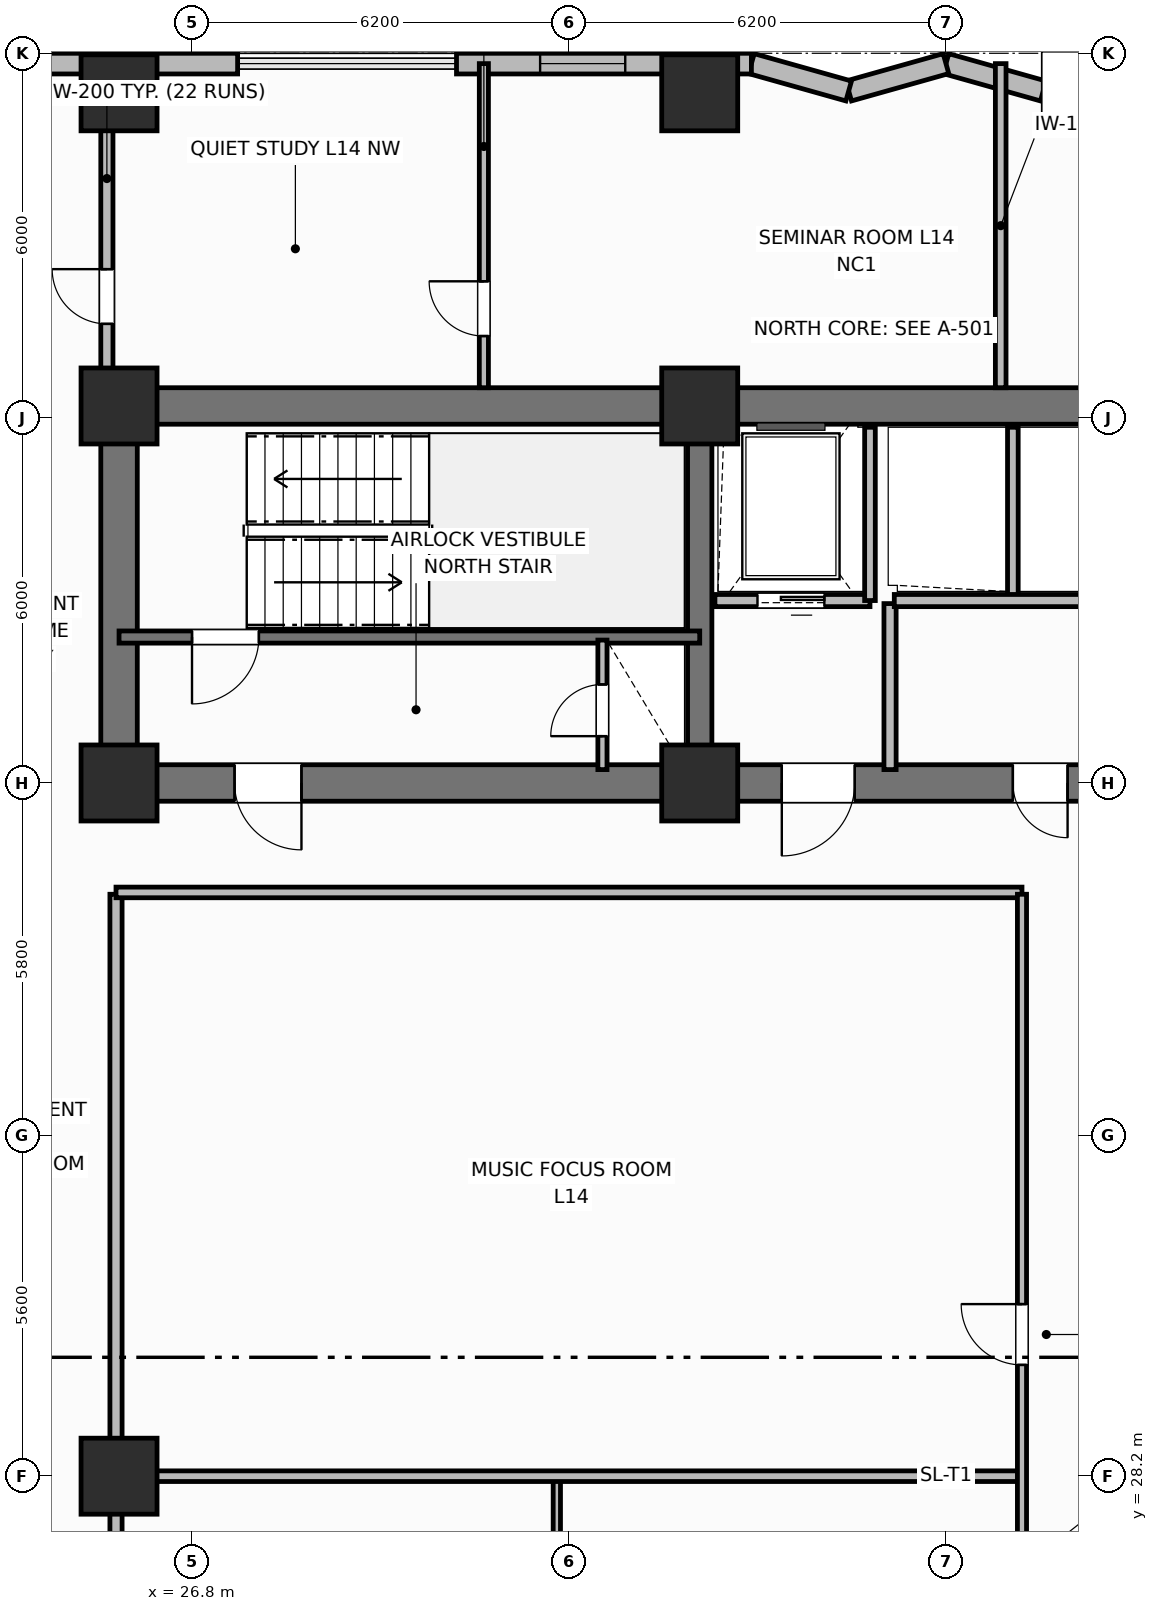
"""IFC4 building model, lengths in metres.
Left out: names, types, materials, properties, quantities, classifications, styles, units other than length and angle.
Written with IfcOpenShell. Run it as: python <this file> out.ifc"""

import sys

from ifc_helpers import new_model, si_unit, direction, frame, frame_2d, origin, origin_2d, place, context, subcontext, project, spatial, rectangle, extrude, element, fill, save


model = new_model("IFC4")
c1 = context("Model", 3, precision=1e-05, world=origin(), true_north=direction((0.0, 1.0)))
c2 = subcontext(c1, "Body", "Model", "MODEL_VIEW")
j1 = project(units=[si_unit("LENGTHUNIT", "METRE"), si_unit("PLANEANGLEUNIT", "RADIAN")], contexts=[c1])
p1 = place(None, origin())
s1 = spatial("IfcSite", under=j1, at=p1, CompositionType="ELEMENT")
p2 = place(p1, origin())
s2 = spatial("IfcBuilding", under=s1, at=p2, CompositionType="ELEMENT")
p3 = place(p2, frame((0.0, 0.0, 58.4)))
s3 = spatial("IfcBuildingStorey", under=s2, at=p3, CompositionType="ELEMENT", Elevation=58.4)
p4 = place(p3, frame((25.6, 45.8, 0.0), z_axis=(0.0, 0.0, 1.0), x_axis=(1.0, 0.0, 0.0)))
e1 = element("IfcWall", 1, at=p4, inside=s3, PredefinedType="SHEAR", context=c2, shape_type="SweptSolid", body=[
    extrude(rectangle(XDim=27.2, YDim=0.6, at=frame_2d((13.6, 0.0))), origin(), (0.0, 0.0, 1.0), 3.7),
])
p5 = place(p3, frame((25.6, 39.9, 0.0), z_axis=(0.0, 0.0, 1.0), x_axis=(0.0, 1.0, 0.0)))
e2 = element("IfcWall", 2, at=p5, inside=s3, PredefinedType="SHEAR", context=c2, shape_type="SweptSolid", body=[
    extrude(rectangle(XDim=5.6, YDim=0.6, at=frame_2d((2.8, 0.0))), origin(), (0.0, 0.0, 1.0), 3.7),
])
p6 = place(p3, frame((52.8, 39.6, 0.0), z_axis=(0.0, 0.0, 1.0), x_axis=(-1.0, 0.0, 0.0)))
e3 = element("IfcWall", 3, at=p6, inside=s3, PredefinedType="SHEAR", context=c2, shape_type="SweptSolid", body=[
    extrude(rectangle(XDim=27.2, YDim=0.6, at=frame_2d((13.6, 0.0))), origin(), (0.0, 0.0, 1.0), 3.7),
])
p7 = place(p6, frame((24.2, 0.0, 0.0)))
e4 = element("IfcOpeningElement", 4, at=p7, cuts=e3, PredefinedType="OPENING", context=c2, shape_type="SweptSolid", body=[
    extrude(rectangle(XDim=1.1, YDim=2.15, at=frame_2d((0.55, 1.075))), frame((0.0, 0.31, 0.0), z_axis=(0.0, -1.0, 0.0), x_axis=(1.0, 0.0, 0.0)), (0.0, 0.0, 1.0), 0.62),
])
p8 = place(p6, frame((15.1, 0.0, 0.0)))
e5 = element("IfcOpeningElement", 5, at=p8, cuts=e3, PredefinedType="OPENING", context=c2, shape_type="SweptSolid", body=[
    extrude(rectangle(XDim=1.2, YDim=2.15, at=frame_2d((0.6, 1.075))), frame((0.0, 0.31, 0.0), z_axis=(0.0, -1.0, 0.0), x_axis=(1.0, 0.0, 0.0)), (0.0, 0.0, 1.0), 0.62),
])
p9 = place(p6, frame((11.6, 0.0, 0.0)))
e6 = element("IfcOpeningElement", 6, at=p9, cuts=e3, PredefinedType="OPENING", context=c2, shape_type="SweptSolid", body=[
    extrude(rectangle(XDim=0.9, YDim=2.1, at=frame_2d((0.45, 1.05))), frame((0.0, 0.31, 0.0), z_axis=(0.0, -1.0, 0.0), x_axis=(1.0, 0.0, 0.0)), (0.0, 0.0, 1.0), 0.62),
])
p10 = place(p6, frame((3.6, 0.0, 0.0)))
e7 = element("IfcOpeningElement", 7, at=p10, cuts=e3, PredefinedType="OPENING", context=c2, shape_type="SweptSolid", body=[
    extrude(rectangle(XDim=1.0, YDim=2.15, at=frame_2d((0.5, 1.075))), frame((0.0, 0.31, 0.0), z_axis=(0.0, -1.0, 0.0), x_axis=(1.0, 0.0, 0.0)), (0.0, 0.0, 1.0), 0.62),
])
p11 = place(p3, frame((35.15, 39.9, 0.0), z_axis=(0.0, 0.0, 1.0), x_axis=(0.0, 1.0, 0.0)))
e8 = element("IfcWall", 8, at=p11, inside=s3, PredefinedType="SHEAR", context=c2, shape_type="SweptSolid", body=[
    extrude(rectangle(XDim=5.6, YDim=0.4, at=frame_2d((2.8, 0.0))), origin(), (0.0, 0.0, 1.0), 3.7),
])
for number, where, z_axis, x_axis in (
    (9, (25.6, 39.6, 0.0), (0.0, 0.0, 1.0), (1.0, 0.0, 0.0)),
    (10, (25.6, 45.8, 0.0), (0.0, 0.0, 1.0), (1.0, 0.0, 0.0)),
    (11, (35.15, 39.6, 0.0), (0.0, 0.0, 1.0), (1.0, 0.0, 0.0)),
    (12, (35.15, 45.8, 0.0), (0.0, 0.0, 1.0), (1.0, 0.0, 0.0)),
    (13, (25.6, 28.2, 0.0), (0.0, 0.0, 1.0), (1.0, 0.0, 0.0)),
    (14, (25.6, 50.95, 0.0), (0.0, 0.0, 1.0), (1.0, 0.0, 0.0)),
    (15, (35.15, 50.95, 0.0), (0.0, 0.0, 1.0), (1.0, 0.0, 0.0)),
):
    element("IfcColumn", number, at=place(p3, frame(where, z_axis=z_axis, x_axis=x_axis)), inside=s3, PredefinedType="COLUMN", context=c2, shape_type="SweptSolid", body=[
        extrude(rectangle(XDim=1.25, YDim=1.25, at=origin_2d()), origin(), (0.0, 0.0, 1.0), 3.7),
    ])
p12 = place(p3, frame((42.4, 51.43, 0.0), z_axis=(0.0, 0.0, 1.0), x_axis=(-0.962652136636, -0.270741322725, 0.0)))
e16 = element("IfcWall", 16, at=p12, inside=s3, PredefinedType="SOLIDWALL", context=c2, shape_type="SweptSolid", body=[
    extrude(rectangle(XDim=1.662, YDim=0.34, at=frame_2d((0.831, 0.0))), origin(), (0.0, 0.0, 1.0), 2.7),
])
p13 = place(p3, frame((40.8, 50.98, 0.0), z_axis=(0.0, 0.0, 1.0), x_axis=(-0.962662902433, 0.270703040766, 0.0)))
e17 = element("IfcWall", 17, at=p13, inside=s3, PredefinedType="SOLIDWALL", context=c2, shape_type="SweptSolid", body=[
    extrude(rectangle(XDim=1.662, YDim=0.34, at=frame_2d((0.831, 0.0))), origin(), (0.0, 0.0, 1.0), 2.7),
])
p14 = place(p3, frame((39.2, 51.43, 0.0), z_axis=(0.0, 0.0, 1.0), x_axis=(-0.962652136636, -0.270741322725, 0.0)))
e18 = element("IfcWall", 18, at=p14, inside=s3, PredefinedType="SOLIDWALL", context=c2, shape_type="SweptSolid", body=[
    extrude(rectangle(XDim=1.662, YDim=0.34, at=frame_2d((0.831, 0.0))), origin(), (0.0, 0.0, 1.0), 2.7),
])
p15 = place(p3, frame((37.6, 50.98, 0.0), z_axis=(0.0, 0.0, 1.0), x_axis=(-0.962662902433, 0.270703040766, 0.0)))
e19 = element("IfcWall", 19, at=p15, inside=s3, PredefinedType="SOLIDWALL", context=c2, shape_type="SweptSolid", body=[
    extrude(rectangle(XDim=1.662, YDim=0.34, at=frame_2d((0.831, 0.0))), origin(), (0.0, 0.0, 1.0), 2.7),
])
p16 = place(p3, frame((36.0, 51.43, 0.0), z_axis=(0.0, 0.0, 1.0), x_axis=(-1.0, 0.0, 0.0)))
e20 = element("IfcWall", 20, at=p16, inside=s3, PredefinedType="SOLIDWALL", context=c2, shape_type="SweptSolid", body=[
    extrude(rectangle(XDim=4.85, YDim=0.34, at=frame_2d((2.425, 0.0))), origin(), (0.0, 0.0, 1.0), 2.7),
])
p17 = place(p16, frame((2.075, 0.0, 0.73)))
e21 = element("IfcOpeningElement", 21, at=p17, cuts=e20, PredefinedType="OPENING", context=c2, shape_type="SweptSolid", body=[
    extrude(rectangle(XDim=1.4, YDim=1.85, at=frame_2d((0.7, 0.925))), frame((0.0, 0.18, 0.0), z_axis=(0.0, -1.0, 0.0), x_axis=(1.0, 0.0, 0.0)), (0.0, 0.0, 1.0), 0.36),
])
p18 = place(p3, frame((27.55, 51.43, 0.0), z_axis=(0.0, 0.0, 1.0), x_axis=(-1.0, 0.0, 0.0)))
e22 = element("IfcWall", 22, at=p18, inside=s3, PredefinedType="SOLIDWALL", context=c2, shape_type="SweptSolid", body=[
    extrude(rectangle(XDim=8.95, YDim=0.34, at=frame_2d((4.475, 0.0))), origin(), (0.0, 0.0, 1.0), 2.7),
])
p19 = place(p18, frame((5.688, 0.0, 0.73)))
e23 = element("IfcOpeningElement", 23, at=p19, cuts=e22, PredefinedType="OPENING", context=c2, shape_type="SweptSolid", body=[
    extrude(rectangle(XDim=1.4, YDim=1.85, at=frame_2d((0.7, 0.925))), frame((0.0, 0.18, 0.0), z_axis=(0.0, -1.0, 0.0), x_axis=(1.0, 0.0, 0.0)), (0.0, 0.0, 1.0), 0.36),
])
p20 = place(p3, frame((35.15, 42.0, 0.0), z_axis=(0.0, 0.0, 1.0), x_axis=(-1.0, 0.0, 0.0)))
e24 = element("IfcWall", 24, at=p20, inside=s3, PredefinedType="SHEAR", context=c2, shape_type="SweptSolid", body=[
    extrude(rectangle(XDim=9.55, YDim=0.2, at=frame_2d((4.775, 0.0))), origin(), (0.0, 0.0, 1.0), 3.7),
])
p21 = place(p20, frame((7.25, 0.0, 0.0)))
e25 = element("IfcOpeningElement", 25, at=p21, cuts=e24, PredefinedType="OPENING", context=c2, shape_type="SweptSolid", body=[
    extrude(rectangle(XDim=1.1, YDim=2.15, at=frame_2d((0.55, 1.075))), frame((0.0, 0.11, 0.0), z_axis=(0.0, -1.0, 0.0), x_axis=(1.0, 0.0, 0.0)), (0.0, 0.0, 1.0), 0.22),
])
p22 = place(p3, frame((33.55, 39.82, 0.0), z_axis=(0.0, 0.0, 1.0), x_axis=(0.0, 1.0, 0.0)))
e26 = element("IfcWall", 26, at=p22, inside=s3, PredefinedType="PARTITIONING", context=c2, shape_type="SweptSolid", body=[
    extrude(rectangle(XDim=2.13, YDim=0.15, at=frame_2d((1.065, 0.0))), origin(), (0.0, 0.0, 1.0), 2.53),
])
p23 = place(p22, frame((0.55, 0.0, 0.0)))
e27 = element("IfcOpeningElement", 27, at=p23, cuts=e26, PredefinedType="OPENING", context=c2, shape_type="SweptSolid", body=[
    extrude(rectangle(XDim=0.85, YDim=2.05, at=frame_2d((0.425, 1.025))), frame((0.0, 0.085, 0.0), z_axis=(0.0, -1.0, 0.0), x_axis=(1.0, 0.0, 0.0)), (0.0, 0.0, 1.0), 0.17),
])
p24 = place(p3, frame((37.95, 42.6, 0.0), z_axis=(0.0, 0.0, 1.0), x_axis=(-1.0, 0.0, 0.0)))
e28 = element("IfcWall", 28, at=p24, inside=s3, PredefinedType="PARTITIONING", context=c2, shape_type="SweptSolid", body=[
    extrude(rectangle(XDim=2.55, YDim=0.2, at=frame_2d((1.275, 0.0))), origin(), (0.0, 0.0, 1.0), 2.3),
])
p25 = place(p24, frame((0.75, 0.0, 0.0)))
e29 = element("IfcOpeningElement", 29, at=p25, cuts=e28, PredefinedType="OPENING", context=c2, shape_type="SweptSolid", body=[
    extrude(rectangle(XDim=1.1, YDim=2.15, at=frame_2d((0.55, 1.075))), frame((0.0, 0.11, 0.0), z_axis=(0.0, -1.0, 0.0), x_axis=(1.0, 0.0, 0.0)), (0.0, 0.0, 1.0), 0.22),
])
p26 = place(p3, frame((37.95, 42.6, 0.0), z_axis=(0.0, 0.0, 1.0), x_axis=(0.0, 1.0, 0.0)))
e30 = element("IfcWall", 30, at=p26, inside=s3, PredefinedType="PARTITIONING", context=c2, shape_type="SweptSolid", body=[
    extrude(rectangle(XDim=2.85, YDim=0.175, at=frame_2d((1.425, 0.0))), origin(), (0.0, 0.0, 1.0), 2.53),
])
p27 = place(p3, frame((38.28, 39.82, 0.0), z_axis=(0.0, 0.0, 1.0), x_axis=(0.0, 1.0, 0.0)))
e31 = element("IfcWall", 31, at=p27, inside=s3, PredefinedType="PARTITIONING", context=c2, shape_type="SweptSolid", body=[
    extrude(rectangle(XDim=2.73, YDim=0.2, at=frame_2d((1.365, 0.0))), origin(), (0.0, 0.0, 1.0), 2.53),
])
p28 = place(p3, frame((40.3, 42.65, 0.0), z_axis=(0.0, 0.0, 1.0), x_axis=(0.0, 1.0, 0.0)))
e32 = element("IfcWall", 32, at=p28, inside=s3, PredefinedType="PARTITIONING", context=c2, shape_type="SweptSolid", body=[
    extrude(rectangle(XDim=2.8, YDim=0.175, at=frame_2d((1.4, 0.0))), origin(), (0.0, 0.0, 1.0), 2.53),
])
p29 = place(p3, frame((42.95, 42.6, 0.0), z_axis=(0.0, 0.0, 1.0), x_axis=(-1.0, 0.0, 0.0)))
e33 = element("IfcWall", 33, at=p29, inside=s3, PredefinedType="PARTITIONING", context=c2, shape_type="SweptSolid", body=[
    extrude(rectangle(XDim=4.6, YDim=0.2, at=frame_2d((2.3, 0.0))), origin(), (0.0, 0.0, 1.0), 2.3),
])
p30 = place(p3, frame((25.55, 18.63, 0.0), z_axis=(0.0, 0.0, 1.0), x_axis=(0.0, 1.0, 0.0)))
e34 = element("IfcWall", 34, at=p30, inside=s3, PredefinedType="PARTITIONING", context=c2, shape_type="SweptSolid", body=[
    extrude(rectangle(XDim=19.14, YDim=0.2, at=frame_2d((9.57, 0.0))), origin(), (0.0, 0.0, 1.0), 2.53),
])
p31 = place(p3, frame((25.55, 37.8, 0.0), z_axis=(0.0, 0.0, 1.0), x_axis=(1.0, 0.0, 0.0)))
e35 = element("IfcWall", 35, at=p31, inside=s3, PredefinedType="PARTITIONING", context=c2, shape_type="SweptSolid", body=[
    extrude(rectangle(XDim=14.9, YDim=0.175, at=frame_2d((7.45, 0.0))), origin(), (0.0, 0.0, 1.0), 2.53),
])
p32 = place(p3, frame((32.8, 18.66, 0.0), z_axis=(0.0, 0.0, 1.0), x_axis=(0.0, 1.0, 0.0)))
e36 = element("IfcWall", 36, at=p32, inside=s3, PredefinedType="PARTITIONING", context=c2, shape_type="SweptSolid", body=[
    extrude(rectangle(XDim=9.49, YDim=0.12, at=frame_2d((4.745, 0.0))), origin(), (0.0, 0.0, 1.0), 2.53),
])
p33 = place(p32, frame((2.2, 0.0, 0.0)))
e37 = element("IfcOpeningElement", 37, at=p33, cuts=e36, PredefinedType="OPENING", context=c2, shape_type="SweptSolid", body=[
    extrude(rectangle(XDim=0.9, YDim=2.1, at=frame_2d((0.45, 1.05))), frame((0.0, 0.07, 0.0), z_axis=(0.0, -1.0, 0.0), x_axis=(1.0, 0.0, 0.0)), (0.0, 0.0, 1.0), 0.14),
])
p34 = place(p3, frame((25.6, 28.2, 0.0), z_axis=(0.0, 0.0, 1.0), x_axis=(1.0, 0.0, 0.0)))
e38 = element("IfcWall", 38, at=p34, inside=s3, PredefinedType="PARTITIONING", context=c2, shape_type="SweptSolid", body=[
    extrude(rectangle(XDim=14.87, YDim=0.175, at=frame_2d((7.435, 0.0))), origin(), (0.0, 0.0, 1.0), 2.53),
])
p35 = place(p3, frame((40.45, 18.63, 0.0), z_axis=(0.0, 0.0, 1.0), x_axis=(0.0, 1.0, 0.0)))
e39 = element("IfcWall", 39, at=p35, inside=s3, PredefinedType="PARTITIONING", context=c2, shape_type="SweptSolid", body=[
    extrude(rectangle(XDim=19.14, YDim=0.15, at=frame_2d((9.57, 0.0))), origin(), (0.0, 0.0, 1.0), 2.53),
])
p36 = place(p35, frame((2.4, 0.0, 0.0)))
e40 = element("IfcOpeningElement", 40, at=p36, cuts=e39, PredefinedType="OPENING", context=c2, shape_type="SweptSolid", body=[
    extrude(rectangle(XDim=1.0, YDim=2.15, at=frame_2d((0.5, 1.075))), frame((0.0, 0.085, 0.0), z_axis=(0.0, -1.0, 0.0), x_axis=(1.0, 0.0, 0.0)), (0.0, 0.0, 1.0), 0.17),
])
p37 = place(p35, frame((11.4, 0.0, 0.0)))
e41 = element("IfcOpeningElement", 41, at=p37, cuts=e39, PredefinedType="OPENING", context=c2, shape_type="SweptSolid", body=[
    extrude(rectangle(XDim=1.0, YDim=2.15, at=frame_2d((0.5, 1.075))), frame((0.0, 0.085, 0.0), z_axis=(0.0, -1.0, 0.0), x_axis=(1.0, 0.0, 0.0)), (0.0, 0.0, 1.0), 0.17),
])
p38 = place(p3, frame((31.6, 46.1, 0.0), z_axis=(0.0, 0.0, 1.0), x_axis=(0.0, 1.0, 0.0)))
e42 = element("IfcWall", 42, at=p38, inside=s3, PredefinedType="PARTITIONING", context=c2, shape_type="SweptSolid", body=[
    extrude(rectangle(XDim=5.33, YDim=0.15, at=frame_2d((2.665, 0.0))), origin(), (0.0, 0.0, 1.0), 2.53),
])
p39 = place(p38, frame((0.85, 0.0, 0.0)))
e43 = element("IfcOpeningElement", 43, at=p39, cuts=e42, PredefinedType="OPENING", context=c2, shape_type="SweptSolid", body=[
    extrude(rectangle(XDim=0.9, YDim=2.1, at=frame_2d((0.45, 1.05))), frame((0.0, 0.085, 0.0), z_axis=(0.0, -1.0, 0.0), x_axis=(1.0, 0.0, 0.0)), (0.0, 0.0, 1.0), 0.17),
])
p40 = place(p3, frame((40.1, 46.1, 0.0), z_axis=(0.0, 0.0, 1.0), x_axis=(0.0, 1.0, 0.0)))
e44 = element("IfcWall", 44, at=p40, inside=s3, PredefinedType="PARTITIONING", context=c2, shape_type="SweptSolid", body=[
    extrude(rectangle(XDim=5.33, YDim=0.175, at=frame_2d((2.665, 0.0))), origin(), (0.0, 0.0, 1.0), 2.53),
])
p41 = place(p3, frame((25.4, 46.1, 0.0), z_axis=(0.0, 0.0, 1.0), x_axis=(0.0, 1.0, 0.0)))
e45 = element("IfcWall", 45, at=p41, inside=s3, PredefinedType="PARTITIONING", context=c2, shape_type="SweptSolid", body=[
    extrude(rectangle(XDim=4.58, YDim=0.2, at=frame_2d((2.29, 0.0))), origin(), (0.0, 0.0, 1.0), 2.53),
])
p42 = place(p41, frame((1.05, 0.0, 0.0)))
e46 = element("IfcOpeningElement", 46, at=p42, cuts=e45, PredefinedType="OPENING", context=c2, shape_type="SweptSolid", body=[
    extrude(rectangle(XDim=0.9, YDim=2.1, at=frame_2d((0.45, 1.05))), frame((0.0, 0.11, 0.0), z_axis=(0.0, -1.0, 0.0), x_axis=(1.0, 0.0, 0.0)), (0.0, 0.0, 1.0), 0.22),
])
p43 = place(p17, origin())
e47 = element("IfcWindow", 47, at=p43, inside=s3, PartitioningType="SINGLE_PANEL", PredefinedType="WINDOW", context=c2, shape_type="SweptSolid", body=[
    extrude(rectangle(XDim=1.4, YDim=1.85, at=frame_2d((0.7, 0.925))), frame((0.0, 0.03, 0.0), z_axis=(0.0, -1.0, 0.0), x_axis=(1.0, 0.0, 0.0)), (0.0, 0.0, 1.0), 0.06),
])
fill(e21, e47)
p44 = place(p21, origin())
e48 = element("IfcDoor", 48, at=p44, inside=s3, OperationType="SINGLE_SWING_RIGHT", PredefinedType="DOOR", context=c2, shape_type="SweptSolid", body=[
    extrude(rectangle(XDim=1.1, YDim=2.15, at=frame_2d((0.55, 1.075))), frame((0.0, 0.025, 0.0), z_axis=(0.0, -1.0, 0.0), x_axis=(1.0, 0.0, 0.0)), (0.0, 0.0, 1.0), 0.05),
])
fill(e25, e48)
p45 = place(p23, origin())
e49 = element("IfcDoor", 49, at=p45, inside=s3, OperationType="SINGLE_SWING_LEFT", PredefinedType="TRAPDOOR", context=c2, shape_type="SweptSolid", body=[
    extrude(rectangle(XDim=0.85, YDim=2.05, at=frame_2d((0.425, 1.025))), frame((0.0, 0.025, 0.0), z_axis=(0.0, -1.0, 0.0), x_axis=(1.0, 0.0, 0.0)), (0.0, 0.0, 1.0), 0.05),
])
fill(e27, e49)
p46 = place(p25, origin())
e50 = element("IfcDoor", 50, at=p46, inside=s3, OperationType="SLIDING_TO_LEFT", PredefinedType="DOOR", context=c2, shape_type="SweptSolid", body=[
    extrude(rectangle(XDim=1.1, YDim=2.15, at=frame_2d((0.55, 1.075))), frame((0.0, 0.025, 0.0), z_axis=(0.0, -1.0, 0.0), x_axis=(1.0, 0.0, 0.0)), (0.0, 0.0, 1.0), 0.05),
])
fill(e29, e50)
p47 = place(p37, origin())
e51 = element("IfcDoor", 51, at=p47, inside=s3, OperationType="SINGLE_SWING_RIGHT", PredefinedType="DOOR", context=c2, shape_type="SweptSolid", body=[
    extrude(rectangle(XDim=1.0, YDim=2.15, at=frame_2d((0.5, 1.075))), frame((0.0, 0.025, 0.0), z_axis=(0.0, -1.0, 0.0), x_axis=(1.0, 0.0, 0.0)), (0.0, 0.0, 1.0), 0.05),
])
fill(e41, e51)
p48 = place(p39, origin())
e52 = element("IfcDoor", 52, at=p48, inside=s3, OperationType="SINGLE_SWING_RIGHT", PredefinedType="DOOR", context=c2, shape_type="SweptSolid", body=[
    extrude(rectangle(XDim=0.9, YDim=2.1, at=frame_2d((0.45, 1.05))), frame((0.0, 0.025, 0.0), z_axis=(0.0, -1.0, 0.0), x_axis=(1.0, 0.0, 0.0)), (0.0, 0.0, 1.0), 0.05),
])
fill(e43, e52)
p49 = place(p42, origin())
e53 = element("IfcDoor", 53, at=p49, inside=s3, OperationType="SINGLE_SWING_RIGHT", PredefinedType="DOOR", context=c2, shape_type="SweptSolid", body=[
    extrude(rectangle(XDim=0.9, YDim=2.1, at=frame_2d((0.45, 1.05))), frame((0.0, 0.025, 0.0), z_axis=(0.0, -1.0, 0.0), x_axis=(1.0, 0.0, 0.0)), (0.0, 0.0, 1.0), 0.05),
])
fill(e46, e53)
p50 = place(p7, origin())
e54 = element("IfcDoor", 54, at=p50, inside=s3, OperationType="SINGLE_SWING_LEFT", PredefinedType="DOOR", context=c2, shape_type="SweptSolid", body=[
    extrude(rectangle(XDim=1.1, YDim=2.15, at=frame_2d((0.55, 1.075))), frame((0.0, 0.025, 0.0), z_axis=(0.0, -1.0, 0.0), x_axis=(1.0, 0.0, 0.0)), (0.0, 0.0, 1.0), 0.05),
])
fill(e4, e54)
p51 = place(p8, origin())
e55 = element("IfcDoor", 55, at=p51, inside=s3, OperationType="SINGLE_SWING_RIGHT", PredefinedType="DOOR", context=c2, shape_type="SweptSolid", body=[
    extrude(rectangle(XDim=1.2, YDim=2.15, at=frame_2d((0.6, 1.075))), frame((0.0, 0.025, 0.0), z_axis=(0.0, -1.0, 0.0), x_axis=(1.0, 0.0, 0.0)), (0.0, 0.0, 1.0), 0.05),
])
fill(e5, e55)
p52 = place(p9, origin())
e56 = element("IfcDoor", 56, at=p52, inside=s3, OperationType="SINGLE_SWING_LEFT", PredefinedType="DOOR", context=c2, shape_type="SweptSolid", body=[
    extrude(rectangle(XDim=0.9, YDim=2.1, at=frame_2d((0.45, 1.05))), frame((0.0, 0.025, 0.0), z_axis=(0.0, -1.0, 0.0), x_axis=(1.0, 0.0, 0.0)), (0.0, 0.0, 1.0), 0.05),
])
fill(e6, e56)
save(model, sys.argv[1])
